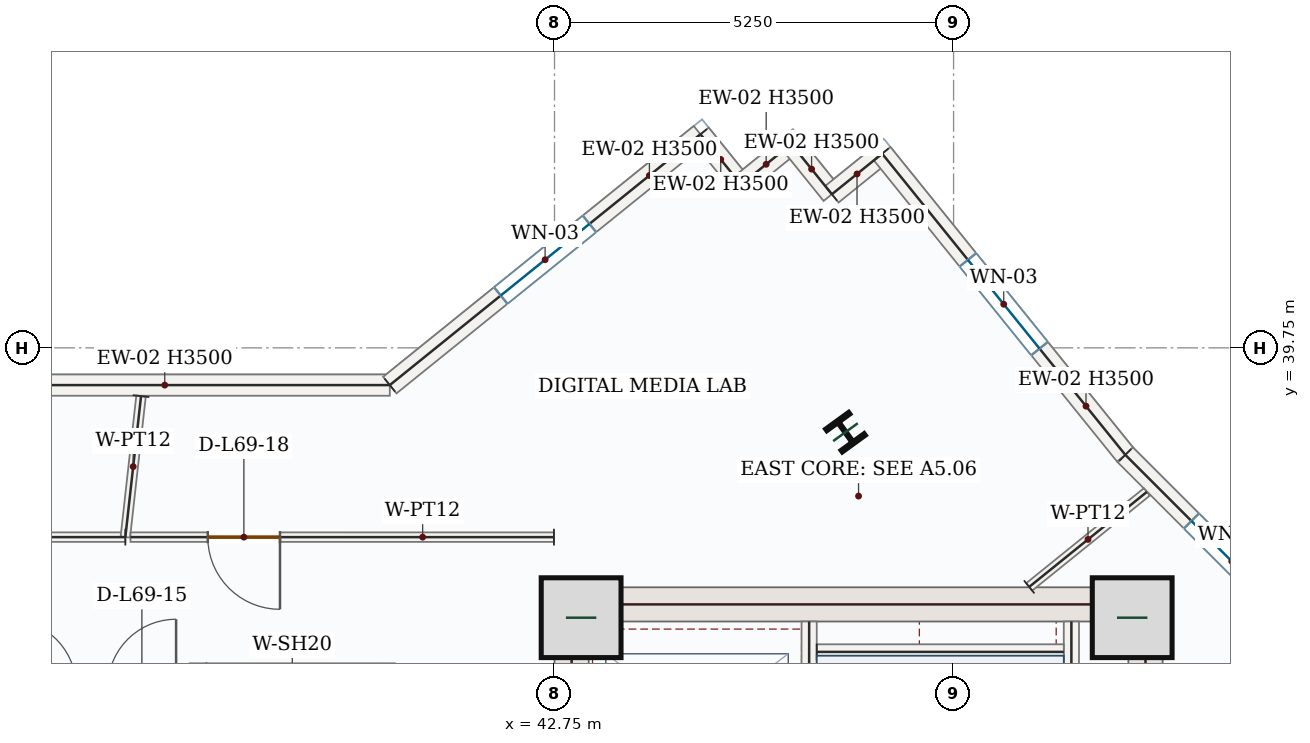
"""IFC4 building model, lengths in metres.
Left out: names, types, materials, properties, quantities, classifications, styles, units other than length and angle.
Written with IfcOpenShell. Run it as: python <this file> out.ifc"""

import sys

from ifc_helpers import new_model, si_unit, direction, frame, frame_2d, origin, origin_2d, place, context, subcontext, project, spatial, rectangle, i_section, extrude, source, transform, mapped, element, fill, save


model = new_model("IFC4")
c1 = context("Model", 3, precision=1e-05, world=origin(), true_north=direction((0.0, 1.0)))
c2 = subcontext(c1, "Body", "Model", "MODEL_VIEW")
j1 = project(units=[si_unit("LENGTHUNIT", "METRE"), si_unit("PLANEANGLEUNIT", "RADIAN")], contexts=[c1])
p1 = place(None, origin())
s1 = spatial("IfcSite", under=j1, at=p1, CompositionType="ELEMENT")
p2 = place(p1, origin())
s2 = spatial("IfcBuilding", under=s1, at=p2, CompositionType="ELEMENT")
p3 = place(p2, frame((0.0, 0.0, 287.85)))
s3 = spatial("IfcBuildingStorey", under=s2, at=p3, CompositionType="ELEMENT", Elevation=287.85)
p4 = place(p3, frame((42.975, 28.05, 0.0), z_axis=(0.0, 0.0, 1.0), x_axis=(0.0, 1.0, 0.0)))
e1 = element("IfcWall", 1, at=p4, inside=s3, PredefinedType="SHEAR", context=c2, shape_type="SweptSolid", body=[
    extrude(rectangle(XDim=8.55, YDim=0.45, at=frame_2d((4.275, 0.0))), origin(), (0.0, 0.0, 1.0), 3.5),
])
p5 = place(p4, frame((1.5, 0.0, 0.0)))
e2 = element("IfcOpeningElement", 2, at=p5, cuts=e1, PredefinedType="OPENING", context=c2, shape_type="SweptSolid", body=[
    extrude(rectangle(XDim=1.1, YDim=2.2, at=frame_2d((0.55, 1.1))), frame((0.0, 0.235, 0.0), z_axis=(0.0, -1.0, 0.0), x_axis=(1.0, 0.0, 0.0)), (0.0, 0.0, 1.0), 0.47),
])
m1 = source(origin(), c2, "Body", "SweptSolid", [
    extrude(rectangle(XDim=8.55, YDim=0.45, at=frame_2d((4.275, 0.0))), origin(), (0.0, 0.0, 1.0), 3.5),
])
p6 = place(p3, frame((50.525, 28.05, 0.0), z_axis=(0.0, 0.0, 1.0), x_axis=(0.0, 1.0, 0.0)))
e3 = element("IfcWall", 3, at=p6, inside=s3, PredefinedType="SHEAR", context=c2, shape_type="MappedRepresentation", body=[
    mapped(m1, transform((0.0, 0.0, 0.0), x_axis=(1.0, 0.0, 0.0), y_axis=(0.0, 1.0, 0.0), z_axis=(0.0, 0.0, 1.0), scale=1.0)),
])
m2 = source(origin(), c2, "Body", "SweptSolid", [
    extrude(rectangle(XDim=7.1, YDim=0.45, at=frame_2d((3.55, 0.0))), origin(), (0.0, 0.0, 1.0), 3.5),
])
p7 = place(p3, frame((43.2, 36.375, 0.0), z_axis=(0.0, 0.0, 1.0), x_axis=(1.0, 0.0, 0.0)))
e4 = element("IfcWall", 4, at=p7, inside=s3, PredefinedType="SHEAR", context=c2, shape_type="MappedRepresentation", body=[
    mapped(m2, transform((0.0, 0.0, 0.0), x_axis=(1.0, 0.0, 0.0), y_axis=(0.0, 1.0, 0.0), z_axis=(0.0, 0.0, 1.0), scale=1.0)),
])
m3 = source(origin(), c2, "Body", "SweptSolid", [
    extrude(rectangle(XDim=1.05, YDim=1.05, at=origin_2d()), origin(), (0.0, 0.0, 1.0), 3.75),
])
for number, where, z_axis, x_axis in (
    (5, (43.1, 36.2, 0.0), (0.0, 0.0, 1.0), (1.0, 0.0, 0.0)),
    (6, (50.35, 36.2, 0.0), (0.0, 0.0, 1.0), (1.0, 0.0, 0.0)),
):
    element("IfcColumn", number, at=place(p3, frame(where, z_axis=z_axis, x_axis=x_axis)), inside=s3, PredefinedType="COLUMN", context=c2, shape_type="MappedRepresentation", body=[
        mapped(m3, transform((0.0, 0.0, 0.0), x_axis=(1.0, 0.0, 0.0), y_axis=(0.0, 1.0, 0.0), z_axis=(0.0, 0.0, 1.0), scale=1.0)),
    ])
m4 = source(origin(), c2, "Body", "SweptSolid", [
    extrude(i_section(OverallWidth=0.374, OverallDepth=0.372, WebThickness=0.016, FlangeThickness=0.026, FilletRadius=0.018, at=origin_2d()), origin(), (0.0, 0.0, 1.0), 3.75),
])
p8 = place(p3, frame((46.578, 38.641, 0.0), z_axis=(0.0, 0.0, 1.0), x_axis=(0.809016994375, 0.587785252292, 0.0)))
e7 = element("IfcColumn", 7, at=p8, inside=s3, PredefinedType="COLUMN", context=c2, shape_type="MappedRepresentation", body=[
    mapped(m4, transform((0.0, 0.0, 0.0), x_axis=(1.0, 0.0, 0.0), y_axis=(0.0, 1.0, 0.0), z_axis=(0.0, 0.0, 1.0), scale=1.0)),
])
m5 = source(origin(), c2, "Body", "SweptSolid", [
    extrude(rectangle(XDim=5.922, YDim=0.28, at=frame_2d((2.961, 0.0))), origin(), (0.0, 0.0, 1.0), 3.5),
])
p9 = place(p3, frame((34.661, 39.26, 0.0), z_axis=(0.0, 0.0, 1.0), x_axis=(1.0, 0.0, 0.0)))
e8 = element("IfcWall", 8, at=p9, inside=s3, PredefinedType="SOLIDWALL", context=c2, shape_type="MappedRepresentation", body=[
    mapped(m5, transform((0.0, 0.0, 0.0), x_axis=(1.0, 0.0, 0.0), y_axis=(0.0, 1.0, 0.0), z_axis=(0.0, 0.0, 1.0), scale=1.0)),
])
p10 = place(p3, frame((40.583, 39.26, 0.0), z_axis=(0.0, 0.0, 1.0), x_axis=(0.778072238875, 0.628174809342, 0.0)))
e9 = element("IfcWall", 9, at=p10, inside=s3, PredefinedType="SOLIDWALL", context=c2, shape_type="SweptSolid", body=[
    extrude(rectangle(XDim=5.253, YDim=0.28, at=frame_2d((2.626, 0.0))), origin(), (0.0, 0.0, 1.0), 3.5),
])
p11 = place(p10, frame((1.876, 0.0, 0.85)))
e10 = element("IfcOpeningElement", 10, at=p11, cuts=e9, PredefinedType="OPENING", context=c2, shape_type="SweptSolid", body=[
    extrude(rectangle(XDim=1.5, YDim=1.5, at=frame_2d((0.75, 0.75))), frame((0.0, 0.15, 0.0), z_axis=(0.0, -1.0, 0.0), x_axis=(1.0, 0.0, 0.0)), (0.0, 0.0, 1.0), 0.3),
])
m6 = source(origin(), c2, "Body", "SweptSolid", [
    extrude(rectangle(XDim=0.85, YDim=0.28, at=frame_2d((0.425, 0.0))), origin(), (0.0, 0.0, 1.0), 3.5),
])
p12 = place(p3, frame((44.67, 42.56, 0.0), z_axis=(0.0, 0.0, 1.0), x_axis=(0.628156579423, -0.778086956405, 0.0)))
e11 = element("IfcWall", 11, at=p12, inside=s3, PredefinedType="SOLIDWALL", context=c2, shape_type="MappedRepresentation", body=[
    mapped(m6, transform((0.0, 0.0, 0.0), x_axis=(1.0, 0.0, 0.0), y_axis=(0.0, 1.0, 0.0), z_axis=(0.0, 0.0, 1.0), scale=1.0)),
])
m7 = source(origin(), c2, "Body", "SweptSolid", [
    extrude(rectangle(XDim=0.85, YDim=0.28, at=frame_2d((0.425, 0.0))), origin(), (0.0, 0.0, 1.0), 3.5),
])
p13 = place(p3, frame((45.204, 41.898, 0.0), z_axis=(0.0, 0.0, 1.0), x_axis=(0.777973585776, 0.628296983786, 0.0)))
e12 = element("IfcWall", 12, at=p13, inside=s3, PredefinedType="SOLIDWALL", context=c2, shape_type="MappedRepresentation", body=[
    mapped(m7, transform((0.0, 0.0, 0.0), x_axis=(1.0, 0.0, 0.0), y_axis=(0.0, 1.0, 0.0), z_axis=(0.0, 0.0, 1.0), scale=1.0)),
])
p14 = place(p3, frame((45.865, 42.432, 0.0), z_axis=(0.0, 0.0, 1.0), x_axis=(0.628330422687, -0.777946579095, 0.0)))
e13 = element("IfcWall", 13, at=p14, inside=s3, PredefinedType="SOLIDWALL", context=c2, shape_type="MappedRepresentation", body=[
    mapped(m6, transform((0.0, 0.0, 0.0), x_axis=(1.0, 0.0, 0.0), y_axis=(0.0, 1.0, 0.0), z_axis=(0.0, 0.0, 1.0), scale=1.0)),
])
p15 = place(p3, frame((46.399, 41.771, 0.0), z_axis=(0.0, 0.0, 1.0), x_axis=(0.777973585776, 0.628296983786, 0.0)))
e14 = element("IfcWall", 14, at=p15, inside=s3, PredefinedType="SOLIDWALL", context=c2, shape_type="MappedRepresentation", body=[
    mapped(m7, transform((0.0, 0.0, 0.0), x_axis=(1.0, 0.0, 0.0), y_axis=(0.0, 1.0, 0.0), z_axis=(0.0, 0.0, 1.0), scale=1.0)),
])
p16 = place(p3, frame((47.06, 42.305, 0.0), z_axis=(0.0, 0.0, 1.0), x_axis=(0.628225517447, -0.778031297075, 0.0)))
e15 = element("IfcWall", 15, at=p16, inside=s3, PredefinedType="SOLIDWALL", context=c2, shape_type="SweptSolid", body=[
    extrude(rectangle(XDim=5.093, YDim=0.28, at=frame_2d((2.546, 0.0))), origin(), (0.0, 0.0, 1.0), 3.5),
])
p17 = place(p16, frame((1.796, 0.0, 0.85)))
e16 = element("IfcOpeningElement", 16, at=p17, cuts=e15, PredefinedType="OPENING", context=c2, shape_type="SweptSolid", body=[
    extrude(rectangle(XDim=1.5, YDim=1.5, at=frame_2d((0.75, 0.75))), frame((0.0, 0.15, 0.0), z_axis=(0.0, -1.0, 0.0), x_axis=(1.0, 0.0, 0.0)), (0.0, 0.0, 1.0), 0.3),
])
p18 = place(p3, frame((50.26, 38.342, 0.0), z_axis=(0.0, 0.0, 1.0), x_axis=(0.707106781187, -0.707106781187, 0.0)))
e17 = element("IfcWall", 17, at=p18, inside=s3, PredefinedType="SOLIDWALL", context=c2, shape_type="SweptSolid", body=[
    extrude(rectangle(XDim=3.96, YDim=0.28, at=frame_2d((1.98, 0.0))), origin(), (0.0, 0.0, 1.0), 3.5),
])
p19 = place(p18, frame((1.23, 0.0, 0.85)))
e18 = element("IfcOpeningElement", 18, at=p19, cuts=e17, PredefinedType="OPENING", context=c2, shape_type="SweptSolid", body=[
    extrude(rectangle(XDim=1.5, YDim=1.5, at=frame_2d((0.75, 0.75))), frame((0.0, 0.15, 0.0), z_axis=(0.0, -1.0, 0.0), x_axis=(1.0, 0.0, 0.0)), (0.0, 0.0, 1.0), 0.3),
])
m8 = source(origin(), c2, "Body", "SweptSolid", [
    extrude(rectangle(XDim=7.87, YDim=0.2, at=frame_2d((3.935, 0.0))), origin(), (0.0, 0.0, 1.0), 3.5),
])
p20 = place(p3, frame((49.55, 28.28, 0.0), z_axis=(0.0, 0.0, 1.0), x_axis=(0.0, 1.0, 0.0)))
e19 = element("IfcWall", 19, at=p20, inside=s3, PredefinedType="SOLIDWALL", context=c2, shape_type="MappedRepresentation", body=[
    mapped(m8, transform((0.0, 0.0, 0.0), x_axis=(1.0, 0.0, 0.0), y_axis=(0.0, 1.0, 0.0), z_axis=(0.0, 0.0, 1.0), scale=1.0)),
])
p21 = place(p3, frame((46.1, 28.15, 0.0), z_axis=(0.0, 0.0, 1.0), x_axis=(0.0, 1.0, 0.0)))
e20 = element("IfcWall", 20, at=p21, inside=s3, PredefinedType="SOLIDWALL", context=c2, shape_type="SweptSolid", body=[
    extrude(rectangle(XDim=8.0, YDim=0.2, at=frame_2d((4.0, 0.0))), origin(), (0.0, 0.0, 1.0), 3.5),
])
p22 = place(p21, frame((0.4, 0.0, 0.0)))
e21 = element("IfcOpeningElement", 21, at=p22, cuts=e20, PredefinedType="OPENING", context=c2, shape_type="SweptSolid", body=[
    extrude(rectangle(XDim=1.05, YDim=2.15, at=frame_2d((0.525, 1.075))), frame((0.0, 0.11, 0.0), z_axis=(0.0, -1.0, 0.0), x_axis=(1.0, 0.0, 0.0)), (0.0, 0.0, 1.0), 0.22),
])
m9 = source(origin(), c2, "Body", "SweptSolid", [
    extrude(rectangle(XDim=3.25, YDim=0.2, at=frame_2d((1.625, 0.0))), origin(), (0.0, 0.0, 1.0), 3.5),
])
p23 = place(p3, frame((46.2, 35.75, 0.0), z_axis=(0.0, 0.0, 1.0), x_axis=(1.0, 0.0, 0.0)))
e22 = element("IfcWall", 22, at=p23, inside=s3, PredefinedType="SOLIDWALL", context=c2, shape_type="MappedRepresentation", body=[
    mapped(m9, transform((0.0, 0.0, 0.0), x_axis=(1.0, 0.0, 0.0), y_axis=(0.0, 1.0, 0.0), z_axis=(0.0, 0.0, 1.0), scale=1.0)),
])
m10 = source(origin(), c2, "Body", "SweptSolid", [
    extrude(rectangle(XDim=2.4, YDim=0.2, at=frame_2d((1.2, 0.0))), origin(), (0.0, 0.0, 1.0), 3.5),
])
p24 = place(p3, frame((38.05, 33.2, 0.0), z_axis=(0.0, 0.0, 1.0), x_axis=(0.0, 1.0, 0.0)))
e23 = element("IfcWall", 23, at=p24, inside=s3, PredefinedType="SOLIDWALL", context=c2, shape_type="MappedRepresentation", body=[
    mapped(m10, transform((0.0, 0.0, 0.0), x_axis=(1.0, 0.0, 0.0), y_axis=(0.0, 1.0, 0.0), z_axis=(0.0, 0.0, 1.0), scale=1.0)),
])
p25 = place(p3, frame((40.55, 33.2, 0.0), z_axis=(0.0, 0.0, 1.0), x_axis=(0.0, 1.0, 0.0)))
e24 = element("IfcWall", 24, at=p25, inside=s3, PredefinedType="SOLIDWALL", context=c2, shape_type="SweptSolid", body=[
    extrude(rectangle(XDim=2.4, YDim=0.2, at=frame_2d((1.2, 0.0))), origin(), (0.0, 0.0, 1.0), 3.5),
])
p26 = place(p25, frame((0.65, 0.0, 0.0)))
e25 = element("IfcOpeningElement", 25, at=p26, cuts=e24, PredefinedType="OPENING", context=c2, shape_type="SweptSolid", body=[
    extrude(rectangle(XDim=1.1, YDim=2.15, at=frame_2d((0.55, 1.075))), frame((0.0, 0.11, 0.0), z_axis=(0.0, -1.0, 0.0), x_axis=(1.0, 0.0, 0.0)), (0.0, 0.0, 1.0), 0.22),
])
m11 = source(origin(), c2, "Body", "SweptSolid", [
    extrude(rectangle(XDim=1.989, YDim=0.125, at=frame_2d((0.995, 0.0))), origin(), (0.0, 0.0, 1.0), 3.5),
])
p27 = place(p3, frame((48.995, 36.605, 0.0), z_axis=(0.0, 0.0, 1.0), x_axis=(0.778058853423, 0.628191388519, 0.0)))
e26 = element("IfcWall", 26, at=p27, inside=s3, PredefinedType="PARTITIONING", context=c2, shape_type="MappedRepresentation", body=[
    mapped(m11, transform((0.0, 0.0, 0.0), x_axis=(1.0, 0.0, 0.0), y_axis=(0.0, 1.0, 0.0), z_axis=(0.0, 0.0, 1.0), scale=1.0)),
])
p28 = place(p3, frame((37.104, 37.26, 0.0), z_axis=(0.0, 0.0, 1.0), x_axis=(-1.0, 0.0, 0.0)))
e27 = element("IfcWall", 27, at=p28, inside=s3, PredefinedType="PARTITIONING", context=c2, shape_type="SweptSolid", body=[
    extrude(rectangle(XDim=6.727, YDim=0.125, at=frame_2d((3.364, 0.0))), origin(), (0.0, 0.0, 1.0), 3.5),
])
p29 = place(p28, frame((1.271, 0.0, 0.0)))
e28 = element("IfcOpeningElement", 28, at=p29, cuts=e27, PredefinedType="OPENING", context=c2, shape_type="SweptSolid", body=[
    extrude(rectangle(XDim=0.95, YDim=2.15, at=frame_2d((0.475, 1.075))), frame((0.0, 0.073, 0.0), z_axis=(0.0, -1.0, 0.0), x_axis=(1.0, 0.0, 0.0)), (0.0, 0.0, 1.0), 0.145),
])
m12 = source(origin(), c2, "Body", "SweptSolid", [
    extrude(rectangle(XDim=1.866, YDim=0.125, at=frame_2d((0.933, 0.0))), origin(), (0.0, 0.0, 1.0), 3.5),
])
p30 = place(p3, frame((37.31, 39.115, 0.0), z_axis=(0.0, 0.0, 1.0), x_axis=(-0.110661229882, -0.993858185156, 0.0)))
e29 = element("IfcWall", 29, at=p30, inside=s3, PredefinedType="PARTITIONING", context=c2, shape_type="MappedRepresentation", body=[
    mapped(m12, transform((0.0, 0.0, 0.0), x_axis=(1.0, 0.0, 0.0), y_axis=(0.0, 1.0, 0.0), z_axis=(0.0, 0.0, 1.0), scale=1.0)),
])
p31 = place(p3, frame((42.742, 37.26, 0.0), z_axis=(0.0, 0.0, 1.0), x_axis=(-0.99999999904, 4.382505e-05, 0.0)))
e30 = element("IfcWall", 30, at=p31, inside=s3, PredefinedType="PARTITIONING", context=c2, shape_type="SweptSolid", body=[
    extrude(rectangle(XDim=5.571, YDim=0.125, at=frame_2d((2.785, 0.0))), origin(), (0.0, 0.0, 1.0), 3.5),
])
p32 = place(p31, frame((3.604, 0.0, 0.0)))
e31 = element("IfcOpeningElement", 31, at=p32, cuts=e30, PredefinedType="OPENING", context=c2, shape_type="SweptSolid", body=[
    extrude(rectangle(XDim=0.95, YDim=2.15, at=frame_2d((0.475, 1.075))), frame((0.0, 0.073, 0.0), z_axis=(0.0, -1.0, 0.0), x_axis=(1.0, 0.0, 0.0)), (0.0, 0.0, 1.0), 0.145),
])
m13 = source(origin(), c2, "Body", "SweptSolid", [
    extrude(rectangle(XDim=1.5, YDim=1.5, at=frame_2d((0.75, 0.75))), frame((0.0, 0.03, 0.0), z_axis=(0.0, -1.0, 0.0), x_axis=(1.0, 0.0, 0.0)), (0.0, 0.0, 1.0), 0.06),
])
p33 = place(p11, origin())
e32 = element("IfcWindow", 32, at=p33, inside=s3, PartitioningType="SINGLE_PANEL", PredefinedType="WINDOW", context=c2, shape_type="MappedRepresentation", body=[
    mapped(m13, transform((0.0, 0.0, 0.0), x_axis=(1.0, 0.0, 0.0), y_axis=(0.0, 1.0, 0.0), z_axis=(0.0, 0.0, 1.0), scale=1.0)),
])
fill(e10, e32)
p34 = place(p17, origin())
e33 = element("IfcWindow", 33, at=p34, inside=s3, PartitioningType="SINGLE_PANEL", PredefinedType="WINDOW", context=c2, shape_type="MappedRepresentation", body=[
    mapped(m13, transform((0.0, 0.0, 0.0), x_axis=(1.0, 0.0, 0.0), y_axis=(0.0, 1.0, 0.0), z_axis=(0.0, 0.0, 1.0), scale=1.0)),
])
fill(e16, e33)
p35 = place(p19, origin())
e34 = element("IfcWindow", 34, at=p35, inside=s3, PartitioningType="SINGLE_PANEL", PredefinedType="WINDOW", context=c2, shape_type="MappedRepresentation", body=[
    mapped(m13, transform((0.0, 0.0, 0.0), x_axis=(1.0, 0.0, 0.0), y_axis=(0.0, 1.0, 0.0), z_axis=(0.0, 0.0, 1.0), scale=1.0)),
])
fill(e18, e34)
m14 = source(origin(), c2, "Body", "SweptSolid", [
    extrude(rectangle(XDim=0.95, YDim=2.15, at=frame_2d((0.475, 1.075))), frame((0.0, 0.025, 0.0), z_axis=(0.0, -1.0, 0.0), x_axis=(1.0, 0.0, 0.0)), (0.0, 0.0, 1.0), 0.05),
])
p36 = place(p32, origin())
e35 = element("IfcDoor", 35, at=p36, inside=s3, OperationType="SINGLE_SWING_LEFT", PredefinedType="DOOR", context=c2, shape_type="MappedRepresentation", body=[
    mapped(m14, transform((0.0, 0.0, 0.0), x_axis=(1.0, 0.0, 0.0), y_axis=(0.0, 1.0, 0.0), z_axis=(0.0, 0.0, 1.0), scale=1.0)),
])
fill(e31, e35)
save(model, sys.argv[1])
